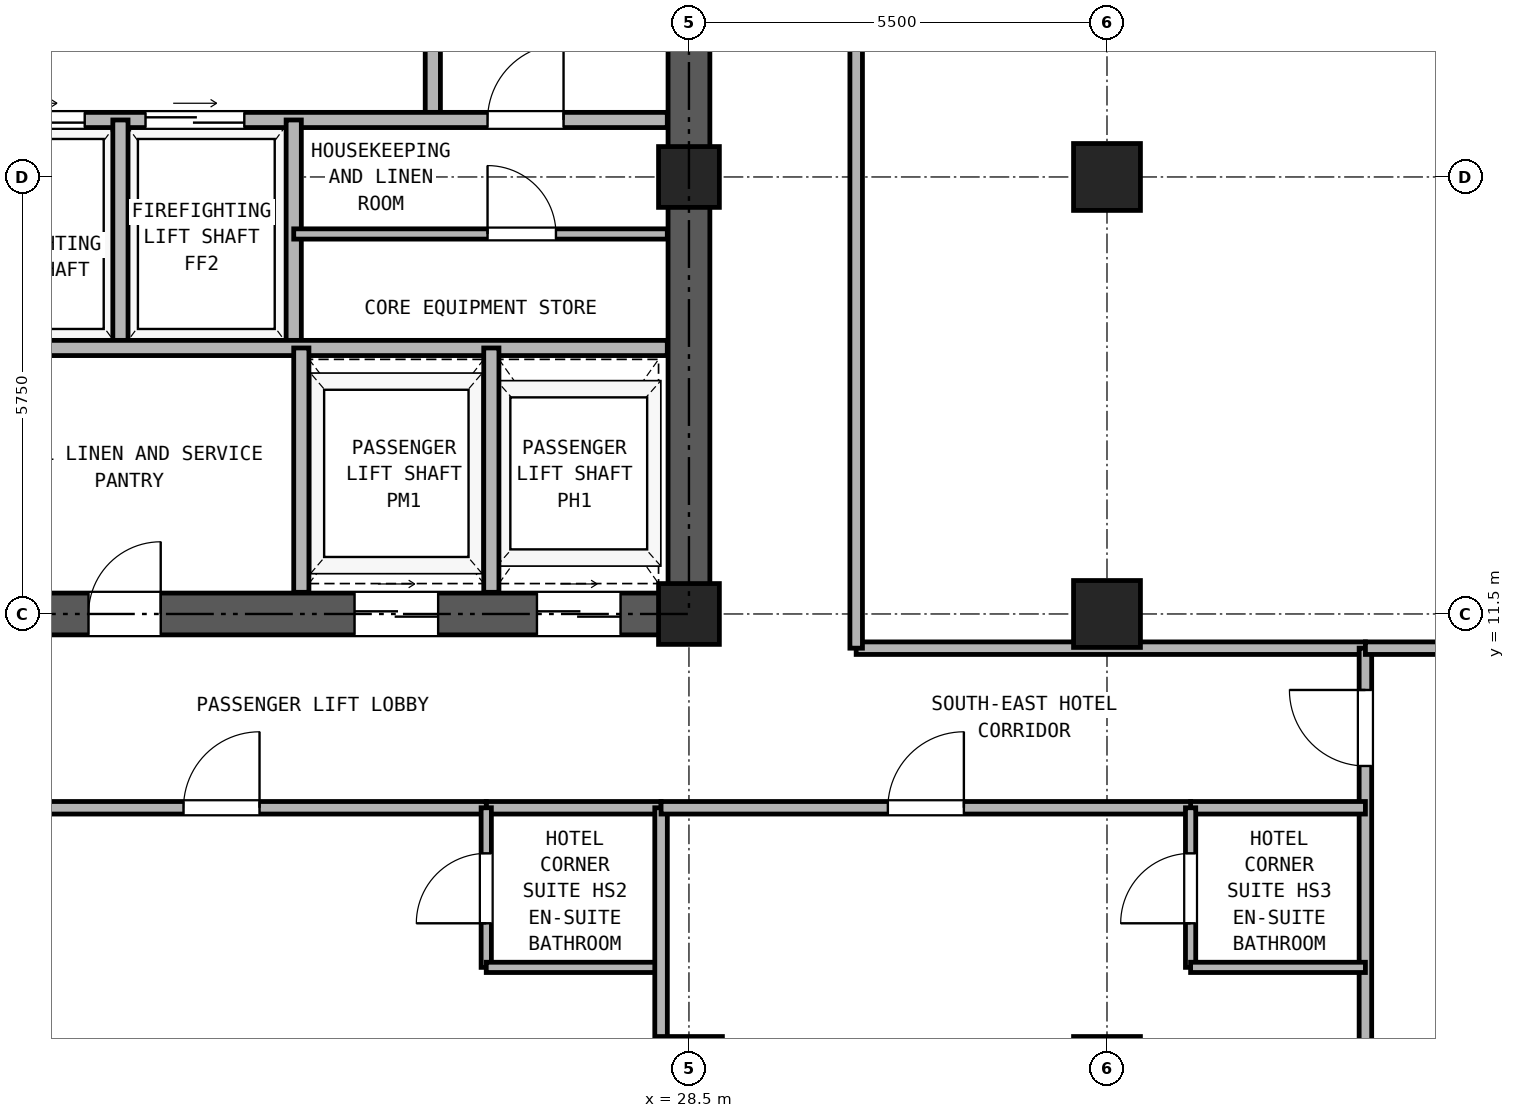
"""IFC4 building model, lengths in metres.
Left out: names, types, materials, properties, quantities, classifications, styles, units other than length and angle.
Written with IfcOpenShell. Run it as: python <this file> out.ifc"""

import sys

from ifc_helpers import new_model, si_unit, direction, frame, frame_2d, origin, origin_2d, place, context, subcontext, project, spatial, rectangle, hollow_rectangle, extrude, source, transform, mapped, element, fill, save


model = new_model("IFC4")
c1 = context("Model", 3, precision=1e-05, world=origin(), true_north=direction((0.0, 1.0)))
c2 = subcontext(c1, "Body", "Model", "MODEL_VIEW")
j1 = project(units=[si_unit("LENGTHUNIT", "METRE"), si_unit("PLANEANGLEUNIT", "RADIAN")], contexts=[c1])
p1 = place(None, origin())
s1 = spatial("IfcSite", under=j1, at=p1, CompositionType="ELEMENT")
p2 = place(p1, origin())
s2 = spatial("IfcBuilding", under=s1, at=p2, CompositionType="ELEMENT")
p3 = place(p2, frame((0.0, 0.0, 127.9)))
s3 = spatial("IfcBuildingStorey", under=s2, at=p3, CompositionType="ELEMENT", Elevation=127.9)
m1 = source(origin(), c2, "Body", "SweptSolid", [
    extrude(hollow_rectangle(XDim=0.88, YDim=0.88, WallThickness=0.05, at=origin_2d()), origin(), (0.0, 0.0, 1.0), 2.95),
])
p4 = place(p3, frame((28.5, 5.5, 0.0), z_axis=(0.0, 0.0, 1.0), x_axis=(1.0, 0.0, 0.0)))
e1 = element("IfcColumn", 1, at=p4, inside=s3, PredefinedType="COLUMN", context=c2, shape_type="MappedRepresentation", body=[
    mapped(m1, transform((0.0, 0.0, 0.0), x_axis=(1.0, 0.0, 0.0), y_axis=(0.0, 1.0, 0.0), z_axis=(0.0, 0.0, 1.0), scale=1.0)),
])
m2 = source(origin(), c2, "Body", "SweptSolid", [
    extrude(hollow_rectangle(XDim=0.8, YDim=0.8, WallThickness=0.045, at=origin_2d()), origin(), (0.0, 0.0, 1.0), 2.95),
])
for number, where, z_axis, x_axis in (
    (2, (28.5, 11.5, 0.0), (0.0, 0.0, 1.0), (1.0, 0.0, 0.0)),
    (3, (28.5, 17.25, 0.0), (0.0, 0.0, 1.0), (1.0, 0.0, 0.0)),
):
    element("IfcColumn", number, at=place(p3, frame(where, z_axis=z_axis, x_axis=x_axis)), inside=s3, PredefinedType="COLUMN", context=c2, shape_type="MappedRepresentation", body=[
        mapped(m2, transform((0.0, 0.0, 0.0), x_axis=(1.0, 0.0, 0.0), y_axis=(0.0, 1.0, 0.0), z_axis=(0.0, 0.0, 1.0), scale=1.0)),
    ])
for number, where, z_axis, x_axis in (
    (4, (34.0, 5.5, 0.0), (0.0, 0.0, 1.0), (1.0, 0.0, 0.0)),
    (5, (34.0, 11.5, 0.0), (0.0, 0.0, 1.0), (1.0, 0.0, 0.0)),
    (6, (34.0, 17.25, 0.0), (0.0, 0.0, 1.0), (1.0, 0.0, 0.0)),
):
    element("IfcColumn", number, at=place(p3, frame(where, z_axis=z_axis, x_axis=x_axis)), inside=s3, PredefinedType="COLUMN", context=c2, shape_type="MappedRepresentation", body=[
        mapped(m1, transform((0.0, 0.0, 0.0), x_axis=(1.0, 0.0, 0.0), y_axis=(0.0, 1.0, 0.0), z_axis=(0.0, 0.0, 1.0), scale=1.0)),
    ])
p5 = place(p3, frame((18.225, 11.5, 0.0), z_axis=(0.0, 0.0, 1.0), x_axis=(1.0, 0.0, 0.0)))
e7 = element("IfcWall", 7, at=p5, inside=s3, PredefinedType="SHEAR", context=c2, shape_type="SweptSolid", body=[
    extrude(rectangle(XDim=10.55, YDim=0.55, at=frame_2d((5.275, 0.0))), origin(), (0.0, 0.0, 1.0), 2.95),
])
p6 = place(p5, frame((2.375, 0.0, 0.0)))
e8 = element("IfcOpeningElement", 8, at=p6, cuts=e7, PredefinedType="OPENING", context=c2, shape_type="SweptSolid", body=[
    extrude(rectangle(XDim=0.95, YDim=2.15, at=frame_2d((0.475, 1.075))), frame((0.0, 0.285, 0.0), z_axis=(0.0, -1.0, 0.0), x_axis=(1.0, 0.0, 0.0)), (0.0, 0.0, 1.0), 0.57),
])
p7 = place(p5, frame((5.875, 0.0, 0.0)))
e9 = element("IfcOpeningElement", 9, at=p7, cuts=e7, PredefinedType="OPENING", context=c2, shape_type="SweptSolid", body=[
    extrude(rectangle(XDim=1.1, YDim=2.25, at=frame_2d((0.55, 1.125))), frame((0.0, 0.285, 0.0), z_axis=(0.0, -1.0, 0.0), x_axis=(1.0, 0.0, 0.0)), (0.0, 0.0, 1.0), 0.57),
])
p8 = place(p5, frame((8.275, 0.0, 0.0)))
e10 = element("IfcOpeningElement", 10, at=p8, cuts=e7, PredefinedType="OPENING", context=c2, shape_type="SweptSolid", body=[
    extrude(rectangle(XDim=1.1, YDim=2.25, at=frame_2d((0.55, 1.125))), frame((0.0, 0.285, 0.0), z_axis=(0.0, -1.0, 0.0), x_axis=(1.0, 0.0, 0.0)), (0.0, 0.0, 1.0), 0.57),
])
p9 = place(p3, frame((28.5, 11.775, 0.0), z_axis=(0.0, 0.0, 1.0), x_axis=(0.0, 1.0, 0.0)))
e11 = element("IfcWall", 11, at=p9, inside=s3, PredefinedType="SHEAR", context=c2, shape_type="SweptSolid", body=[
    extrude(rectangle(XDim=16.7, YDim=0.55, at=frame_2d((8.35, 0.0))), origin(), (0.0, 0.0, 1.0), 2.95),
])
p10 = place(p9, frame((7.375, 0.0, 0.0)))
e12 = element("IfcOpeningElement", 12, at=p10, cuts=e11, PredefinedType="OPENING", context=c2, shape_type="SweptSolid", body=[
    extrude(rectangle(XDim=1.15, YDim=2.2, at=frame_2d((0.575, 1.1))), frame((0.0, 0.285, 0.0), z_axis=(0.0, -1.0, 0.0), x_axis=(1.0, 0.0, 0.0)), (0.0, 0.0, 1.0), 0.57),
])
p11 = place(p3, frame((25.13, 18.0, 0.0), z_axis=(0.0, 0.0, 1.0), x_axis=(0.0, 1.0, 0.0)))
e13 = element("IfcWall", 13, at=p11, inside=s3, PredefinedType="PARTITIONING", context=c2, shape_type="SweptSolid", body=[
    extrude(rectangle(XDim=3.39, YDim=0.2, at=frame_2d((1.695, 0.0))), origin(), (0.0, 0.0, 1.0), 2.95),
])
p12 = place(p11, frame((1.1, 0.0, 0.0)))
e14 = element("IfcOpeningElement", 14, at=p12, cuts=e13, PredefinedType="OPENING", context=c2, shape_type="SweptSolid", body=[
    extrude(rectangle(XDim=1.15, YDim=2.2, at=frame_2d((0.575, 1.1))), frame((0.0, 0.11, 0.0), z_axis=(0.0, -1.0, 0.0), x_axis=(1.0, 0.0, 0.0)), (0.0, 0.0, 1.0), 0.22),
])
p13 = place(p3, frame((18.785, 18.0, 0.0), z_axis=(0.0, 0.0, 1.0), x_axis=(1.0, 0.0, 0.0)))
e15 = element("IfcWall", 15, at=p13, inside=s3, PredefinedType="PARTITIONING", context=c2, shape_type="SweptSolid", body=[
    extrude(rectangle(XDim=9.43, YDim=0.2, at=frame_2d((4.715, 0.0))), origin(), (0.0, 0.0, 1.0), 2.95),
])
p14 = place(p13, frame((0.465, 0.0, 0.0)))
e16 = element("IfcOpeningElement", 16, at=p14, cuts=e15, PredefinedType="OPENING", context=c2, shape_type="SweptSolid", body=[
    extrude(rectangle(XDim=1.3, YDim=2.3, at=frame_2d((0.65, 1.15))), frame((0.0, 0.11, 0.0), z_axis=(0.0, -1.0, 0.0), x_axis=(1.0, 0.0, 0.0)), (0.0, 0.0, 1.0), 0.22),
])
p15 = place(p13, frame((2.565, 0.0, 0.0)))
e17 = element("IfcOpeningElement", 17, at=p15, cuts=e15, PredefinedType="OPENING", context=c2, shape_type="SweptSolid", body=[
    extrude(rectangle(XDim=1.3, YDim=2.3, at=frame_2d((0.65, 1.15))), frame((0.0, 0.11, 0.0), z_axis=(0.0, -1.0, 0.0), x_axis=(1.0, 0.0, 0.0)), (0.0, 0.0, 1.0), 0.22),
])
p16 = place(p13, frame((7.065, 0.0, 0.0)))
e18 = element("IfcOpeningElement", 18, at=p16, cuts=e15, PredefinedType="OPENING", context=c2, shape_type="SweptSolid", body=[
    extrude(rectangle(XDim=1.0, YDim=2.15, at=frame_2d((0.5, 1.075))), frame((0.0, 0.11, 0.0), z_axis=(0.0, -1.0, 0.0), x_axis=(1.0, 0.0, 0.0)), (0.0, 0.0, 1.0), 0.22),
])
for number, where, z_axis, x_axis in (
    (19, (21.02, 15.0, 0.0), (0.0, 0.0, 1.0), (0.0, 1.0, 0.0)),
    (20, (23.3, 15.0, 0.0), (0.0, 0.0, 1.0), (0.0, 1.0, 0.0)),
):
    element("IfcWall", number, at=place(p3, frame(where, z_axis=z_axis, x_axis=x_axis)), inside=s3, PredefinedType="PARTITIONING", context=c2, shape_type="SweptSolid", body=[
        extrude(rectangle(XDim=3.0, YDim=0.2, at=frame_2d((1.5, 0.0))), origin(), (0.0, 0.0, 1.0), 2.95),
    ])
p17 = place(p3, frame((18.785, 15.0, 0.0), z_axis=(0.0, 0.0, 1.0), x_axis=(1.0, 0.0, 0.0)))
e21 = element("IfcWall", 21, at=p17, inside=s3, PredefinedType="PARTITIONING", context=c2, shape_type="SweptSolid", body=[
    extrude(rectangle(XDim=9.43, YDim=0.2, at=frame_2d((4.715, 0.0))), origin(), (0.0, 0.0, 1.0), 2.95),
])
p18 = place(p3, frame((23.3, 16.5, 0.0), z_axis=(0.0, 0.0, 1.0), x_axis=(1.0, 0.0, 0.0)))
e22 = element("IfcWall", 22, at=p18, inside=s3, PredefinedType="PARTITIONING", context=c2, shape_type="SweptSolid", body=[
    extrude(rectangle(XDim=4.915, YDim=0.135, at=frame_2d((2.458, 0.0))), origin(), (0.0, 0.0, 1.0), 2.95),
])
p19 = place(p18, frame((2.55, 0.0, 0.0)))
e23 = element("IfcOpeningElement", 23, at=p19, cuts=e22, PredefinedType="OPENING", context=c2, shape_type="SweptSolid", body=[
    extrude(rectangle(XDim=0.9, YDim=2.05, at=frame_2d((0.45, 1.025))), frame((0.0, 0.077, 0.0), z_axis=(0.0, -1.0, 0.0), x_axis=(1.0, 0.0, 0.0)), (0.0, 0.0, 1.0), 0.155),
])
for number, where, z_axis, x_axis in (
    (24, (23.4, 11.785, 0.0), (0.0, 0.0, 1.0), (0.0, 1.0, 0.0)),
    (25, (25.9, 11.785, 0.0), (0.0, 0.0, 1.0), (0.0, 1.0, 0.0)),
):
    element("IfcWall", number, at=place(p3, frame(where, z_axis=z_axis, x_axis=x_axis)), inside=s3, PredefinedType="PARTITIONING", context=c2, shape_type="SweptSolid", body=[
        extrude(rectangle(XDim=3.215, YDim=0.2, at=frame_2d((1.607, 0.0))), origin(), (0.0, 0.0, 1.0), 2.95),
    ])
p20 = place(p3, frame((30.7, 11.05, 0.0), z_axis=(0.0, 0.0, 1.0), x_axis=(1.0, 0.0, 0.0)))
e26 = element("IfcWall", 26, at=p20, inside=s3, PredefinedType="PARTITIONING", context=c2, shape_type="SweptSolid", body=[
    extrude(rectangle(XDim=6.7, YDim=0.165, at=frame_2d((3.35, 0.0))), origin(), (0.0, 0.0, 1.0), 2.95),
])
p21 = place(p3, frame((30.7, 11.05, 0.0), z_axis=(0.0, 0.0, 1.0), x_axis=(0.0, 1.0, 0.0)))
e27 = element("IfcWall", 27, at=p21, inside=s3, PredefinedType="PARTITIONING", context=c2, shape_type="SweptSolid", body=[
    extrude(rectangle(XDim=18.35, YDim=0.165, at=frame_2d((9.175, 0.0))), origin(), (0.0, 0.0, 1.0), 2.95),
])
p22 = place(p21, frame((8.675, 0.0, 0.0)))
e28 = element("IfcOpeningElement", 28, at=p22, cuts=e27, PredefinedType="OPENING", context=c2, shape_type="SweptSolid", body=[
    extrude(rectangle(XDim=0.95, YDim=2.15, at=frame_2d((0.475, 1.075))), frame((0.0, 0.093, 0.0), z_axis=(0.0, -1.0, 0.0), x_axis=(1.0, 0.0, 0.0)), (0.0, 0.0, 1.0), 0.185),
])
p23 = place(p3, frame((37.4, 0.16, 0.0), z_axis=(0.0, 0.0, 1.0), x_axis=(0.0, 1.0, 0.0)))
e29 = element("IfcWall", 29, at=p23, inside=s3, PredefinedType="PARTITIONING", context=c2, shape_type="SweptSolid", body=[
    extrude(rectangle(XDim=10.89, YDim=0.165, at=frame_2d((5.445, 0.0))), origin(), (0.0, 0.0, 1.0), 2.95),
])
p24 = place(p23, frame((9.34, 0.0, 0.0)))
e30 = element("IfcOpeningElement", 30, at=p24, cuts=e29, PredefinedType="OPENING", context=c2, shape_type="SweptSolid", body=[
    extrude(rectangle(XDim=1.0, YDim=2.15, at=frame_2d((0.5, 1.075))), frame((0.0, 0.093, 0.0), z_axis=(0.0, -1.0, 0.0), x_axis=(1.0, 0.0, 0.0)), (0.0, 0.0, 1.0), 0.185),
])
p25 = place(p3, frame((37.4, 11.05, 0.0), z_axis=(0.0, 0.0, 1.0), x_axis=(1.0, 0.0, 0.0)))
e31 = element("IfcWall", 31, at=p25, inside=s3, PredefinedType="PARTITIONING", context=c2, shape_type="SweptSolid", body=[
    extrude(rectangle(XDim=9.44, YDim=0.165, at=frame_2d((4.72, 0.0))), origin(), (0.0, 0.0, 1.0), 2.95),
])
p26 = place(p3, frame((25.833, 8.95, 0.0), z_axis=(0.0, 0.0, 1.0), x_axis=(1.0, 0.0, 0.0)))
e32 = element("IfcWall", 32, at=p26, inside=s3, PredefinedType="PARTITIONING", context=c2, shape_type="SweptSolid", body=[
    extrude(rectangle(XDim=2.3, YDim=0.165, at=frame_2d((1.15, 0.0))), origin(), (0.0, 0.0, 1.0), 2.95),
])
p27 = place(p3, frame((18.867, 8.95, 0.0), z_axis=(0.0, 0.0, 1.0), x_axis=(1.0, 0.0, 0.0)))
e33 = element("IfcWall", 33, at=p27, inside=s3, PredefinedType="PARTITIONING", context=c2, shape_type="SweptSolid", body=[
    extrude(rectangle(XDim=6.966, YDim=0.165, at=frame_2d((3.483, 0.0))), origin(), (0.0, 0.0, 1.0), 2.95),
])
p28 = place(p27, frame((2.983, 0.0, 0.0)))
e34 = element("IfcOpeningElement", 34, at=p28, cuts=e33, PredefinedType="OPENING", context=c2, shape_type="SweptSolid", body=[
    extrude(rectangle(XDim=1.0, YDim=2.15, at=frame_2d((0.5, 1.075))), frame((0.0, 0.093, 0.0), z_axis=(0.0, -1.0, 0.0), x_axis=(1.0, 0.0, 0.0)), (0.0, 0.0, 1.0), 0.185),
])
p29 = place(p3, frame((25.833, 6.85, 0.0), z_axis=(0.0, 0.0, 1.0), x_axis=(0.0, 1.0, 0.0)))
e35 = element("IfcWall", 35, at=p29, inside=s3, PredefinedType="PARTITIONING", context=c2, shape_type="SweptSolid", body=[
    extrude(rectangle(XDim=2.1, YDim=0.135, at=frame_2d((1.05, 0.0))), origin(), (0.0, 0.0, 1.0), 2.95),
])
p30 = place(p29, frame((0.58, 0.0, 0.0)))
e36 = element("IfcOpeningElement", 36, at=p30, cuts=e35, PredefinedType="OPENING", context=c2, shape_type="SweptSolid", body=[
    extrude(rectangle(XDim=0.92, YDim=2.1, at=frame_2d((0.46, 1.05))), frame((0.0, 0.077, 0.0), z_axis=(0.0, -1.0, 0.0), x_axis=(1.0, 0.0, 0.0)), (0.0, 0.0, 1.0), 0.155),
])
p31 = place(p3, frame((25.833, 6.85, 0.0), z_axis=(0.0, 0.0, 1.0), x_axis=(1.0, 0.0, 0.0)))
e37 = element("IfcWall", 37, at=p31, inside=s3, PredefinedType="PARTITIONING", context=c2, shape_type="SweptSolid", body=[
    extrude(rectangle(XDim=2.3, YDim=0.135, at=frame_2d((1.15, 0.0))), origin(), (0.0, 0.0, 1.0), 2.95),
])
p32 = place(p3, frame((28.133, 0.16, 0.0), z_axis=(0.0, 0.0, 1.0), x_axis=(0.0, 1.0, 0.0)))
e38 = element("IfcWall", 38, at=p32, inside=s3, PredefinedType="PARTITIONING", context=c2, shape_type="SweptSolid", body=[
    extrude(rectangle(XDim=8.79, YDim=0.165, at=frame_2d((4.395, 0.0))), origin(), (0.0, 0.0, 1.0), 2.95),
])
p33 = place(p3, frame((35.1, 8.95, 0.0), z_axis=(0.0, 0.0, 1.0), x_axis=(1.0, 0.0, 0.0)))
e39 = element("IfcWall", 39, at=p33, inside=s3, PredefinedType="PARTITIONING", context=c2, shape_type="SweptSolid", body=[
    extrude(rectangle(XDim=2.3, YDim=0.165, at=frame_2d((1.15, 0.0))), origin(), (0.0, 0.0, 1.0), 2.95),
])
p34 = place(p3, frame((28.133, 8.95, 0.0), z_axis=(0.0, 0.0, 1.0), x_axis=(1.0, 0.0, 0.0)))
e40 = element("IfcWall", 40, at=p34, inside=s3, PredefinedType="PARTITIONING", context=c2, shape_type="SweptSolid", body=[
    extrude(rectangle(XDim=6.967, YDim=0.165, at=frame_2d((3.483, 0.0))), origin(), (0.0, 0.0, 1.0), 2.95),
])
p35 = place(p34, frame((2.984, 0.0, 0.0)))
e41 = element("IfcOpeningElement", 41, at=p35, cuts=e40, PredefinedType="OPENING", context=c2, shape_type="SweptSolid", body=[
    extrude(rectangle(XDim=1.0, YDim=2.15, at=frame_2d((0.5, 1.075))), frame((0.0, 0.093, 0.0), z_axis=(0.0, -1.0, 0.0), x_axis=(1.0, 0.0, 0.0)), (0.0, 0.0, 1.0), 0.185),
])
p36 = place(p3, frame((35.1, 6.85, 0.0), z_axis=(0.0, 0.0, 1.0), x_axis=(0.0, 1.0, 0.0)))
e42 = element("IfcWall", 42, at=p36, inside=s3, PredefinedType="PARTITIONING", context=c2, shape_type="SweptSolid", body=[
    extrude(rectangle(XDim=2.1, YDim=0.135, at=frame_2d((1.05, 0.0))), origin(), (0.0, 0.0, 1.0), 2.95),
])
p37 = place(p36, frame((0.58, 0.0, 0.0)))
e43 = element("IfcOpeningElement", 43, at=p37, cuts=e42, PredefinedType="OPENING", context=c2, shape_type="SweptSolid", body=[
    extrude(rectangle(XDim=0.92, YDim=2.1, at=frame_2d((0.46, 1.05))), frame((0.0, 0.077, 0.0), z_axis=(0.0, -1.0, 0.0), x_axis=(1.0, 0.0, 0.0)), (0.0, 0.0, 1.0), 0.155),
])
p38 = place(p3, frame((35.1, 6.85, 0.0), z_axis=(0.0, 0.0, 1.0), x_axis=(1.0, 0.0, 0.0)))
e44 = element("IfcWall", 44, at=p38, inside=s3, PredefinedType="PARTITIONING", context=c2, shape_type="SweptSolid", body=[
    extrude(rectangle(XDim=2.3, YDim=0.135, at=frame_2d((1.15, 0.0))), origin(), (0.0, 0.0, 1.0), 2.95),
])
p39 = place(p14, origin())
e45 = element("IfcDoor", 45, at=p39, inside=s3, OperationType="DOUBLE_DOOR_SLIDING", PredefinedType="DOOR", context=c2, shape_type="SweptSolid", body=[
    extrude(rectangle(XDim=1.3, YDim=2.3, at=frame_2d((0.65, 1.15))), frame((0.0, 0.025, 0.0), z_axis=(0.0, -1.0, 0.0), x_axis=(1.0, 0.0, 0.0)), (0.0, 0.0, 1.0), 0.05),
])
fill(e16, e45)
p40 = place(p15, origin())
e46 = element("IfcDoor", 46, at=p40, inside=s3, OperationType="DOUBLE_DOOR_SLIDING", PredefinedType="DOOR", context=c2, shape_type="SweptSolid", body=[
    extrude(rectangle(XDim=1.3, YDim=2.3, at=frame_2d((0.65, 1.15))), frame((0.0, 0.025, 0.0), z_axis=(0.0, -1.0, 0.0), x_axis=(1.0, 0.0, 0.0)), (0.0, 0.0, 1.0), 0.05),
])
fill(e17, e46)
p41 = place(p16, frame((1.0, 0.0, 0.0), z_axis=(0.0, 0.0, 1.0), x_axis=(-1.0, 0.0, 0.0)))
e47 = element("IfcDoor", 47, at=p41, inside=s3, OperationType="SINGLE_SWING_RIGHT", PredefinedType="DOOR", context=c2, shape_type="SweptSolid", body=[
    extrude(rectangle(XDim=1.0, YDim=2.15, at=frame_2d((0.5, 1.075))), frame((0.0, 0.025, 0.0), z_axis=(0.0, -1.0, 0.0), x_axis=(1.0, 0.0, 0.0)), (0.0, 0.0, 1.0), 0.05),
])
fill(e18, e47)
p42 = place(p19, frame((0.9, 0.0, 0.0), z_axis=(0.0, 0.0, 1.0), x_axis=(-1.0, 0.0, 0.0)))
e48 = element("IfcDoor", 48, at=p42, inside=s3, OperationType="SINGLE_SWING_LEFT", PredefinedType="DOOR", context=c2, shape_type="SweptSolid", body=[
    extrude(rectangle(XDim=0.9, YDim=2.05, at=frame_2d((0.45, 1.025))), frame((0.0, 0.025, 0.0), z_axis=(0.0, -1.0, 0.0), x_axis=(1.0, 0.0, 0.0)), (0.0, 0.0, 1.0), 0.05),
])
fill(e23, e48)
p43 = place(p6, frame((0.95, 0.0, 0.0), z_axis=(0.0, 0.0, 1.0), x_axis=(-1.0, 0.0, 0.0)))
e49 = element("IfcDoor", 49, at=p43, inside=s3, OperationType="SINGLE_SWING_RIGHT", PredefinedType="DOOR", context=c2, shape_type="SweptSolid", body=[
    extrude(rectangle(XDim=0.95, YDim=2.15, at=frame_2d((0.475, 1.075))), frame((0.0, 0.025, 0.0), z_axis=(0.0, -1.0, 0.0), x_axis=(1.0, 0.0, 0.0)), (0.0, 0.0, 1.0), 0.05),
])
fill(e8, e49)
p44 = place(p7, frame((1.1, 0.0, 0.0), z_axis=(0.0, 0.0, 1.0), x_axis=(-1.0, 0.0, 0.0)))
e50 = element("IfcDoor", 50, at=p44, inside=s3, OperationType="DOUBLE_DOOR_SLIDING", PredefinedType="DOOR", context=c2, shape_type="SweptSolid", body=[
    extrude(rectangle(XDim=1.1, YDim=2.25, at=frame_2d((0.55, 1.125))), frame((0.0, 0.025, 0.0), z_axis=(0.0, -1.0, 0.0), x_axis=(1.0, 0.0, 0.0)), (0.0, 0.0, 1.0), 0.05),
])
fill(e9, e50)
p45 = place(p8, frame((1.1, 0.0, 0.0), z_axis=(0.0, 0.0, 1.0), x_axis=(-1.0, 0.0, 0.0)))
e51 = element("IfcDoor", 51, at=p45, inside=s3, OperationType="DOUBLE_DOOR_SLIDING", PredefinedType="DOOR", context=c2, shape_type="SweptSolid", body=[
    extrude(rectangle(XDim=1.1, YDim=2.25, at=frame_2d((0.55, 1.125))), frame((0.0, 0.025, 0.0), z_axis=(0.0, -1.0, 0.0), x_axis=(1.0, 0.0, 0.0)), (0.0, 0.0, 1.0), 0.05),
])
fill(e10, e51)
p46 = place(p24, frame((1.0, 0.0, 0.0), z_axis=(0.0, 0.0, 1.0), x_axis=(-1.0, 0.0, 0.0)))
e52 = element("IfcDoor", 52, at=p46, inside=s3, OperationType="SINGLE_SWING_RIGHT", PredefinedType="DOOR", context=c2, shape_type="SweptSolid", body=[
    extrude(rectangle(XDim=1.0, YDim=2.15, at=frame_2d((0.5, 1.075))), frame((0.0, 0.025, 0.0), z_axis=(0.0, -1.0, 0.0), x_axis=(1.0, 0.0, 0.0)), (0.0, 0.0, 1.0), 0.05),
])
fill(e30, e52)
p47 = place(p30, origin())
e53 = element("IfcDoor", 53, at=p47, inside=s3, OperationType="SINGLE_SWING_LEFT", PredefinedType="DOOR", context=c2, shape_type="SweptSolid", body=[
    extrude(rectangle(XDim=0.92, YDim=2.1, at=frame_2d((0.46, 1.05))), frame((0.0, 0.025, 0.0), z_axis=(0.0, -1.0, 0.0), x_axis=(1.0, 0.0, 0.0)), (0.0, 0.0, 1.0), 0.05),
])
fill(e36, e53)
p48 = place(p28, frame((1.0, 0.0, 0.0), z_axis=(0.0, 0.0, 1.0), x_axis=(-1.0, 0.0, 0.0)))
e54 = element("IfcDoor", 54, at=p48, inside=s3, OperationType="SINGLE_SWING_RIGHT", PredefinedType="DOOR", context=c2, shape_type="SweptSolid", body=[
    extrude(rectangle(XDim=1.0, YDim=2.15, at=frame_2d((0.5, 1.075))), frame((0.0, 0.025, 0.0), z_axis=(0.0, -1.0, 0.0), x_axis=(1.0, 0.0, 0.0)), (0.0, 0.0, 1.0), 0.05),
])
fill(e34, e54)
p49 = place(p37, origin())
e55 = element("IfcDoor", 55, at=p49, inside=s3, OperationType="SINGLE_SWING_LEFT", PredefinedType="DOOR", context=c2, shape_type="SweptSolid", body=[
    extrude(rectangle(XDim=0.92, YDim=2.1, at=frame_2d((0.46, 1.05))), frame((0.0, 0.025, 0.0), z_axis=(0.0, -1.0, 0.0), x_axis=(1.0, 0.0, 0.0)), (0.0, 0.0, 1.0), 0.05),
])
fill(e43, e55)
p50 = place(p35, frame((1.0, 0.0, 0.0), z_axis=(0.0, 0.0, 1.0), x_axis=(-1.0, 0.0, 0.0)))
e56 = element("IfcDoor", 56, at=p50, inside=s3, OperationType="SINGLE_SWING_RIGHT", PredefinedType="DOOR", context=c2, shape_type="SweptSolid", body=[
    extrude(rectangle(XDim=1.0, YDim=2.15, at=frame_2d((0.5, 1.075))), frame((0.0, 0.025, 0.0), z_axis=(0.0, -1.0, 0.0), x_axis=(1.0, 0.0, 0.0)), (0.0, 0.0, 1.0), 0.05),
])
fill(e41, e56)
save(model, sys.argv[1])
